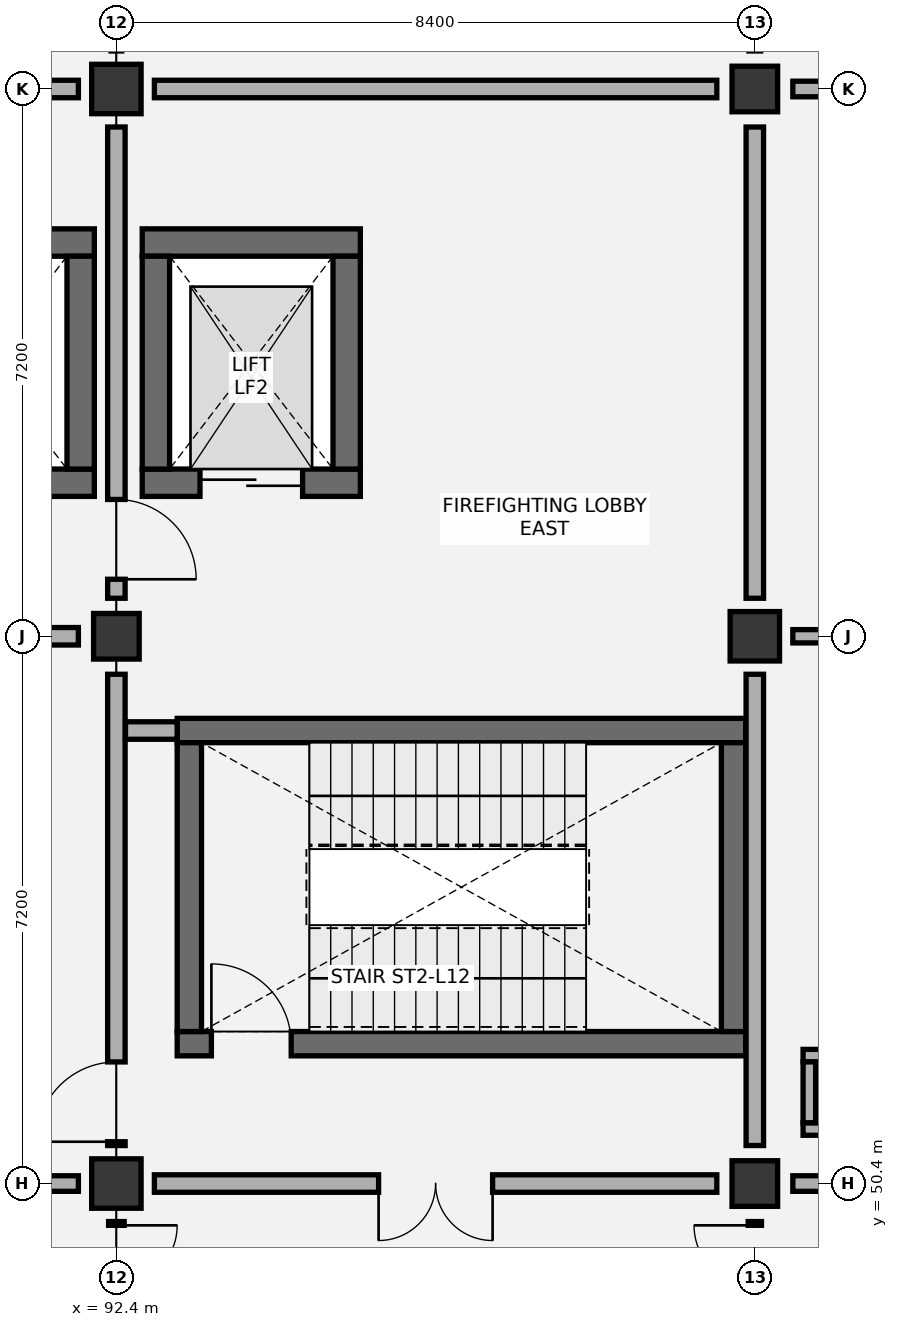
"""IFC4 building model, lengths in metres.
Left out: names, types, materials, properties, quantities, classifications, styles, units other than length and angle.
Written with IfcOpenShell. Run it as: python <this file> out.ifc"""

import sys

from ifc_helpers import new_model, si_unit, direction, frame, frame_2d, origin, origin_2d, place, context, subcontext, project, spatial, rectangle, extrude, element, fill, save


model = new_model("IFC4")
c1 = context("Model", 3, precision=1e-05, world=origin(), true_north=direction((0.0, 1.0)))
c2 = subcontext(c1, "Body", "Model", "MODEL_VIEW")
j1 = project(units=[si_unit("LENGTHUNIT", "METRE"), si_unit("PLANEANGLEUNIT", "RADIAN")], contexts=[c1])
p1 = place(None, origin())
s1 = spatial("IfcSite", under=j1, at=p1, CompositionType="ELEMENT")
p2 = place(p1, origin())
s2 = spatial("IfcBuilding", under=s1, at=p2, CompositionType="ELEMENT")
p3 = place(p2, frame((0.0, 0.0, 56.4)))
s3 = spatial("IfcBuildingStorey", under=s2, at=p3, CompositionType="ELEMENT", Elevation=56.4)
p4 = place(p3, frame((92.4, 50.4, 0.0), z_axis=(0.0, 0.0, 1.0), x_axis=(1.0, 0.0, 0.0)))
e1 = element("IfcColumn", 1, at=p4, inside=s3, PredefinedType="COLUMN", context=c2, shape_type="SweptSolid", body=[
    extrude(rectangle(XDim=0.65, YDim=0.65, at=origin_2d()), origin(), (0.0, 0.0, 1.0), 4.2),
])
p5 = place(p3, frame((92.4, 57.6, 0.0), z_axis=(0.0, 0.0, 1.0), x_axis=(1.0, 0.0, 0.0)))
e2 = element("IfcColumn", 2, at=p5, inside=s3, PredefinedType="COLUMN", context=c2, shape_type="SweptSolid", body=[
    extrude(rectangle(XDim=0.6, YDim=0.6, at=origin_2d()), origin(), (0.0, 0.0, 1.0), 4.2),
])
p6 = place(p3, frame((92.4, 64.8, 0.0), z_axis=(0.0, 0.0, 1.0), x_axis=(1.0, 0.0, 0.0)))
e3 = element("IfcColumn", 3, at=p6, inside=s3, PredefinedType="COLUMN", context=c2, shape_type="SweptSolid", body=[
    extrude(rectangle(XDim=0.65, YDim=0.65, at=origin_2d()), origin(), (0.0, 0.0, 1.0), 4.2),
])
p7 = place(p3, frame((100.8, 50.4, 0.0), z_axis=(0.0, 0.0, 1.0), x_axis=(1.0, 0.0, 0.0)))
e4 = element("IfcColumn", 4, at=p7, inside=s3, PredefinedType="COLUMN", context=c2, shape_type="SweptSolid", body=[
    extrude(rectangle(XDim=0.6, YDim=0.6, at=origin_2d()), origin(), (0.0, 0.0, 1.0), 4.2),
])
p8 = place(p3, frame((100.8, 57.6, 0.0), z_axis=(0.0, 0.0, 1.0), x_axis=(1.0, 0.0, 0.0)))
e5 = element("IfcColumn", 5, at=p8, inside=s3, PredefinedType="COLUMN", context=c2, shape_type="SweptSolid", body=[
    extrude(rectangle(XDim=0.65, YDim=0.65, at=origin_2d()), origin(), (0.0, 0.0, 1.0), 4.2),
])
p9 = place(p3, frame((100.8, 64.8, 0.0), z_axis=(0.0, 0.0, 1.0), x_axis=(1.0, 0.0, 0.0)))
e6 = element("IfcColumn", 6, at=p9, inside=s3, PredefinedType="COLUMN", context=c2, shape_type="SweptSolid", body=[
    extrude(rectangle(XDim=0.6, YDim=0.6, at=origin_2d()), origin(), (0.0, 0.0, 1.0), 4.2),
])
p10 = place(p3, frame((93.2, 52.24, 0.0), z_axis=(0.0, 0.0, 1.0), x_axis=(1.0, 0.0, 0.0)))
e7 = element("IfcWall", 7, at=p10, inside=s3, PredefinedType="SHEAR", context=c2, shape_type="SweptSolid", body=[
    extrude(rectangle(XDim=7.48, YDim=0.32, at=frame_2d((3.74, 0.0))), origin(), (0.0, 0.0, 1.0), 3.92),
])
p11 = place(p10, frame((0.45, 0.0, 0.0)))
e8 = element("IfcOpeningElement", 8, at=p11, cuts=e7, PredefinedType="OPENING", context=c2, shape_type="SweptSolid", body=[
    extrude(rectangle(XDim=1.05, YDim=2.15, at=frame_2d((0.525, 1.075))), frame((0.0, 0.17, 0.0), z_axis=(0.0, -1.0, 0.0), x_axis=(1.0, 0.0, 0.0)), (0.0, 0.0, 1.0), 0.34),
])
p12 = place(p3, frame((93.2, 56.36, 0.0), z_axis=(0.0, 0.0, 1.0), x_axis=(1.0, 0.0, 0.0)))
e9 = element("IfcWall", 9, at=p12, inside=s3, PredefinedType="SHEAR", context=c2, shape_type="SweptSolid", body=[
    extrude(rectangle(XDim=7.48, YDim=0.32, at=frame_2d((3.74, 0.0))), origin(), (0.0, 0.0, 1.0), 3.92),
])
for number, where, z_axis, x_axis in (
    (10, (93.36, 52.4, 0.0), (0.0, 0.0, 1.0), (0.0, 1.0, 0.0)),
    (11, (100.52, 52.4, 0.0), (0.0, 0.0, 1.0), (0.0, 1.0, 0.0)),
):
    element("IfcWall", number, at=place(p3, frame(where, z_axis=z_axis, x_axis=x_axis)), inside=s3, PredefinedType="SHEAR", context=c2, shape_type="SweptSolid", body=[
        extrude(rectangle(XDim=3.8, YDim=0.32, at=frame_2d((1.9, 0.0))), origin(), (0.0, 0.0, 1.0), 3.92),
    ])
p13 = place(p3, frame((84.34, 62.78, 0.0), z_axis=(0.0, 0.0, 1.0), x_axis=(1.0, 0.0, 0.0)))
e12 = element("IfcWall", 12, at=p13, inside=s3, PredefinedType="SHEAR", context=c2, shape_type="SweptSolid", body=[
    extrude(rectangle(XDim=7.77, YDim=0.36, at=frame_2d((3.885, 0.0))), origin(), (0.0, 0.0, 1.0), 3.92),
])
p14 = place(p3, frame((89.45, 59.62, 0.0), z_axis=(0.0, 0.0, 1.0), x_axis=(1.0, 0.0, 0.0)))
e13 = element("IfcWall", 13, at=p14, inside=s3, PredefinedType="SHEAR", context=c2, shape_type="SweptSolid", body=[
    extrude(rectangle(XDim=2.66, YDim=0.36, at=frame_2d((1.33, 0.0))), origin(), (0.0, 0.0, 1.0), 3.92),
])
p15 = place(p14, frame((0.78, 0.0, 0.0)))
e14 = element("IfcOpeningElement", 14, at=p15, cuts=e13, PredefinedType="OPENING", context=c2, shape_type="SweptSolid", body=[
    extrude(rectangle(XDim=1.1, YDim=2.15, at=frame_2d((0.55, 1.075))), frame((0.0, 0.19, 0.0), z_axis=(0.0, -1.0, 0.0), x_axis=(1.0, 0.0, 0.0)), (0.0, 0.0, 1.0), 0.38),
])
p16 = place(p3, frame((91.93, 59.8, 0.0), z_axis=(0.0, 0.0, 1.0), x_axis=(0.0, 1.0, 0.0)))
e15 = element("IfcWall", 15, at=p16, inside=s3, PredefinedType="SHEAR", context=c2, shape_type="SweptSolid", body=[
    extrude(rectangle(XDim=2.8, YDim=0.36, at=frame_2d((1.4, 0.0))), origin(), (0.0, 0.0, 1.0), 3.92),
])
p17 = place(p3, frame((92.74, 62.78, 0.0), z_axis=(0.0, 0.0, 1.0), x_axis=(1.0, 0.0, 0.0)))
e16 = element("IfcWall", 16, at=p17, inside=s3, PredefinedType="SHEAR", context=c2, shape_type="SweptSolid", body=[
    extrude(rectangle(XDim=2.87, YDim=0.36, at=frame_2d((1.435, 0.0))), origin(), (0.0, 0.0, 1.0), 3.92),
])
p18 = place(p3, frame((92.74, 59.62, 0.0), z_axis=(0.0, 0.0, 1.0), x_axis=(1.0, 0.0, 0.0)))
e17 = element("IfcWall", 17, at=p18, inside=s3, PredefinedType="SHEAR", context=c2, shape_type="SweptSolid", body=[
    extrude(rectangle(XDim=2.87, YDim=0.36, at=frame_2d((1.435, 0.0))), origin(), (0.0, 0.0, 1.0), 3.92),
])
p19 = place(p18, frame((0.76, 0.0, 0.0)))
e18 = element("IfcOpeningElement", 18, at=p19, cuts=e17, PredefinedType="OPENING", context=c2, shape_type="SweptSolid", body=[
    extrude(rectangle(XDim=1.35, YDim=2.2, at=frame_2d((0.675, 1.1))), frame((0.0, 0.19, 0.0), z_axis=(0.0, -1.0, 0.0), x_axis=(1.0, 0.0, 0.0)), (0.0, 0.0, 1.0), 0.38),
])
for number, where, z_axis, x_axis in (
    (19, (92.92, 59.8, 0.0), (0.0, 0.0, 1.0), (0.0, 1.0, 0.0)),
    (20, (95.43, 59.8, 0.0), (0.0, 0.0, 1.0), (0.0, 1.0, 0.0)),
):
    element("IfcWall", number, at=place(p3, frame(where, z_axis=z_axis, x_axis=x_axis)), inside=s3, PredefinedType="SHEAR", context=c2, shape_type="SweptSolid", body=[
        extrude(rectangle(XDim=2.8, YDim=0.36, at=frame_2d((1.4, 0.0))), origin(), (0.0, 0.0, 1.0), 3.92),
    ])
for number, where, z_axis, x_axis in (
    (21, (101.435, 51.117, 0.0), (0.0, 0.0, 1.0), (1.0, 0.0, 0.0)),
    (22, (101.435, 52.083, 0.0), (0.0, 0.0, 1.0), (1.0, 0.0, 0.0)),
):
    element("IfcWall", number, at=place(p3, frame(where, z_axis=z_axis, x_axis=x_axis)), inside=s3, PredefinedType="PARTITIONING", context=c2, shape_type="SweptSolid", body=[
        extrude(rectangle(XDim=1.43, YDim=0.165, at=frame_2d((0.715, 0.0))), origin(), (0.0, 0.0, 1.0), 3.85),
    ])
p20 = place(p3, frame((101.518, 51.2, 0.0), z_axis=(0.0, 0.0, 1.0), x_axis=(0.0, 1.0, 0.0)))
e23 = element("IfcWall", 23, at=p20, inside=s3, PredefinedType="PARTITIONING", context=c2, shape_type="SweptSolid", body=[
    extrude(rectangle(XDim=0.8, YDim=0.165, at=frame_2d((0.4, 0.0))), origin(), (0.0, 0.0, 1.0), 3.85),
])
p21 = place(p3, frame((92.4, 43.7, 0.0), z_axis=(0.0, 0.0, 1.0), x_axis=(0.0, 1.0, 0.0)))
e24 = element("IfcWall", 24, at=p21, inside=s3, PredefinedType="PARTITIONING", context=c2, shape_type="SweptSolid", body=[
    extrude(rectangle(XDim=6.2, YDim=0.205, at=frame_2d((3.1, 0.0))), origin(), (0.0, 0.0, 1.0), 3.415),
])
p22 = place(p21, frame((4.55, 0.0, 0.0)))
e25 = element("IfcOpeningElement", 25, at=p22, cuts=e24, PredefinedType="OPENING", context=c2, shape_type="SweptSolid", body=[
    extrude(rectangle(XDim=1.6, YDim=2.2, at=frame_2d((0.8, 1.1))), frame((0.0, 0.113, 0.0), z_axis=(0.0, -1.0, 0.0), x_axis=(1.0, 0.0, 0.0)), (0.0, 0.0, 1.0), 0.225),
])
p23 = place(p3, frame((84.5, 50.4, 0.0), z_axis=(0.0, 0.0, 1.0), x_axis=(1.0, 0.0, 0.0)))
e26 = element("IfcWall", 26, at=p23, inside=s3, PredefinedType="PARTITIONING", context=c2, shape_type="SweptSolid", body=[
    extrude(rectangle(XDim=7.4, YDim=0.205, at=frame_2d((3.7, 0.0))), origin(), (0.0, 0.0, 1.0), 3.415),
])
p24 = place(p23, frame((3.025, 0.0, 0.0)))
e27 = element("IfcOpeningElement", 27, at=p24, cuts=e26, PredefinedType="OPENING", context=c2, shape_type="SweptSolid", body=[
    extrude(rectangle(XDim=1.35, YDim=2.15, at=frame_2d((0.675, 1.075))), frame((0.0, 0.113, 0.0), z_axis=(0.0, -1.0, 0.0), x_axis=(1.0, 0.0, 0.0)), (0.0, 0.0, 1.0), 0.225),
])
p25 = place(p3, frame((92.4, 50.9, 0.0), z_axis=(0.0, 0.0, 1.0), x_axis=(0.0, 1.0, 0.0)))
e28 = element("IfcWall", 28, at=p25, inside=s3, PredefinedType="PARTITIONING", context=c2, shape_type="SweptSolid", body=[
    extrude(rectangle(XDim=6.2, YDim=0.23, at=frame_2d((3.1, 0.0))), origin(), (0.0, 0.0, 1.0), 3.515),
])
p26 = place(p25, frame((0.05, 0.0, 0.0)))
e29 = element("IfcOpeningElement", 29, at=p26, cuts=e28, PredefinedType="OPENING", context=c2, shape_type="SweptSolid", body=[
    extrude(rectangle(XDim=1.05, YDim=2.15, at=frame_2d((0.525, 1.075))), frame((0.0, 0.125, 0.0), z_axis=(0.0, -1.0, 0.0), x_axis=(1.0, 0.0, 0.0)), (0.0, 0.0, 1.0), 0.25),
])
p27 = place(p3, frame((84.5, 57.6, 0.0), z_axis=(0.0, 0.0, 1.0), x_axis=(1.0, 0.0, 0.0)))
e30 = element("IfcWall", 30, at=p27, inside=s3, PredefinedType="PARTITIONING", context=c2, shape_type="SweptSolid", body=[
    extrude(rectangle(XDim=7.4, YDim=0.23, at=frame_2d((3.7, 0.0))), origin(), (0.0, 0.0, 1.0), 3.415),
])
p28 = place(p27, frame((2.95, 0.0, 0.0)))
e31 = element("IfcOpeningElement", 31, at=p28, cuts=e30, PredefinedType="OPENING", context=c2, shape_type="SweptSolid", body=[
    extrude(rectangle(XDim=1.5, YDim=2.15, at=frame_2d((0.75, 1.075))), frame((0.0, 0.125, 0.0), z_axis=(0.0, -1.0, 0.0), x_axis=(1.0, 0.0, 0.0)), (0.0, 0.0, 1.0), 0.25),
])
p29 = place(p3, frame((92.4, 58.1, 0.0), z_axis=(0.0, 0.0, 1.0), x_axis=(0.0, 1.0, 0.0)))
e32 = element("IfcWall", 32, at=p29, inside=s3, PredefinedType="PARTITIONING", context=c2, shape_type="SweptSolid", body=[
    extrude(rectangle(XDim=6.2, YDim=0.23, at=frame_2d((3.1, 0.0))), origin(), (0.0, 0.0, 1.0), 3.415),
])
p30 = place(p29, frame((0.25, 0.0, 0.0)))
e33 = element("IfcOpeningElement", 33, at=p30, cuts=e32, PredefinedType="OPENING", context=c2, shape_type="SweptSolid", body=[
    extrude(rectangle(XDim=1.05, YDim=2.15, at=frame_2d((0.525, 1.075))), frame((0.0, 0.125, 0.0), z_axis=(0.0, -1.0, 0.0), x_axis=(1.0, 0.0, 0.0)), (0.0, 0.0, 1.0), 0.25),
])
p31 = place(p3, frame((84.5, 64.8, 0.0), z_axis=(0.0, 0.0, 1.0), x_axis=(1.0, 0.0, 0.0)))
e34 = element("IfcWall", 34, at=p31, inside=s3, PredefinedType="PARTITIONING", context=c2, shape_type="SweptSolid", body=[
    extrude(rectangle(XDim=7.4, YDim=0.23, at=frame_2d((3.7, 0.0))), origin(), (0.0, 0.0, 1.0), 3.415),
])
p32 = place(p3, frame((100.8, 43.7, 0.0), z_axis=(0.0, 0.0, 1.0), x_axis=(0.0, 1.0, 0.0)))
e35 = element("IfcWall", 35, at=p32, inside=s3, PredefinedType="PARTITIONING", context=c2, shape_type="SweptSolid", body=[
    extrude(rectangle(XDim=6.2, YDim=0.175, at=frame_2d((3.1, 0.0))), origin(), (0.0, 0.0, 1.0), 3.515),
])
p33 = place(p32, frame((4.55, 0.0, 0.0)))
e36 = element("IfcOpeningElement", 36, at=p33, cuts=e35, PredefinedType="OPENING", context=c2, shape_type="SweptSolid", body=[
    extrude(rectangle(XDim=1.6, YDim=2.2, at=frame_2d((0.8, 1.1))), frame((0.0, 0.097, 0.0), z_axis=(0.0, -1.0, 0.0), x_axis=(1.0, 0.0, 0.0)), (0.0, 0.0, 1.0), 0.195),
])
p34 = place(p3, frame((92.9, 50.4, 0.0), z_axis=(0.0, 0.0, 1.0), x_axis=(1.0, 0.0, 0.0)))
e37 = element("IfcWall", 37, at=p34, inside=s3, PredefinedType="PARTITIONING", context=c2, shape_type="SweptSolid", body=[
    extrude(rectangle(XDim=7.4, YDim=0.23, at=frame_2d((3.7, 0.0))), origin(), (0.0, 0.0, 1.0), 3.415),
])
p35 = place(p34, frame((2.95, 0.0, 0.0)))
e38 = element("IfcOpeningElement", 38, at=p35, cuts=e37, PredefinedType="OPENING", context=c2, shape_type="SweptSolid", body=[
    extrude(rectangle(XDim=1.5, YDim=2.15, at=frame_2d((0.75, 1.075))), frame((0.0, 0.125, 0.0), z_axis=(0.0, -1.0, 0.0), x_axis=(1.0, 0.0, 0.0)), (0.0, 0.0, 1.0), 0.25),
])
p36 = place(p3, frame((100.8, 50.9, 0.0), z_axis=(0.0, 0.0, 1.0), x_axis=(0.0, 1.0, 0.0)))
e39 = element("IfcWall", 39, at=p36, inside=s3, PredefinedType="PARTITIONING", context=c2, shape_type="SweptSolid", body=[
    extrude(rectangle(XDim=6.2, YDim=0.23, at=frame_2d((3.1, 0.0))), origin(), (0.0, 0.0, 1.0), 3.415),
])
p37 = place(p3, frame((92.52, 56.36, 0.0), z_axis=(0.0, 0.0, 1.0), x_axis=(1.0, 0.0, 0.0)))
e40 = element("IfcWall", 40, at=p37, inside=s3, PredefinedType="PARTITIONING", context=c2, shape_type="SweptSolid", body=[
    extrude(rectangle(XDim=0.68, YDim=0.23, at=frame_2d((0.34, 0.0))), origin(), (0.0, 0.0, 1.0), 3.92),
])
p38 = place(p3, frame((100.8, 58.1, 0.0), z_axis=(0.0, 0.0, 1.0), x_axis=(0.0, 1.0, 0.0)))
e41 = element("IfcWall", 41, at=p38, inside=s3, PredefinedType="PARTITIONING", context=c2, shape_type="SweptSolid", body=[
    extrude(rectangle(XDim=6.2, YDim=0.23, at=frame_2d((3.1, 0.0))), origin(), (0.0, 0.0, 1.0), 3.625),
])
p39 = place(p3, frame((92.9, 64.8, 0.0), z_axis=(0.0, 0.0, 1.0), x_axis=(1.0, 0.0, 0.0)))
e42 = element("IfcWall", 42, at=p39, inside=s3, PredefinedType="PARTITIONING", context=c2, shape_type="SweptSolid", body=[
    extrude(rectangle(XDim=7.4, YDim=0.23, at=frame_2d((3.7, 0.0))), origin(), (0.0, 0.0, 1.0), 3.415),
])
p40 = place(p3, frame((101.3, 50.4, 0.0), z_axis=(0.0, 0.0, 1.0), x_axis=(1.0, 0.0, 0.0)))
e43 = element("IfcWall", 43, at=p40, inside=s3, PredefinedType="PARTITIONING", context=c2, shape_type="SweptSolid", body=[
    extrude(rectangle(XDim=7.4, YDim=0.205, at=frame_2d((3.7, 0.0))), origin(), (0.0, 0.0, 1.0), 3.415),
])
p41 = place(p40, frame((2.975, 0.0, 0.0)))
e44 = element("IfcOpeningElement", 44, at=p41, cuts=e43, PredefinedType="OPENING", context=c2, shape_type="SweptSolid", body=[
    extrude(rectangle(XDim=1.45, YDim=2.2, at=frame_2d((0.725, 1.1))), frame((0.0, 0.113, 0.0), z_axis=(0.0, -1.0, 0.0), x_axis=(1.0, 0.0, 0.0)), (0.0, 0.0, 1.0), 0.225),
])
p42 = place(p3, frame((101.3, 57.6, 0.0), z_axis=(0.0, 0.0, 1.0), x_axis=(1.0, 0.0, 0.0)))
e45 = element("IfcWall", 45, at=p42, inside=s3, PredefinedType="PARTITIONING", context=c2, shape_type="SweptSolid", body=[
    extrude(rectangle(XDim=7.4, YDim=0.175, at=frame_2d((3.7, 0.0))), origin(), (0.0, 0.0, 1.0), 3.415),
])
p43 = place(p42, frame((3.025, 0.0, 0.0)))
e46 = element("IfcOpeningElement", 46, at=p43, cuts=e45, PredefinedType="OPENING", context=c2, shape_type="SweptSolid", body=[
    extrude(rectangle(XDim=1.35, YDim=2.15, at=frame_2d((0.675, 1.075))), frame((0.0, 0.097, 0.0), z_axis=(0.0, -1.0, 0.0), x_axis=(1.0, 0.0, 0.0)), (0.0, 0.0, 1.0), 0.195),
])
p44 = place(p3, frame((101.3, 64.8, 0.0), z_axis=(0.0, 0.0, 1.0), x_axis=(1.0, 0.0, 0.0)))
e47 = element("IfcWall", 47, at=p44, inside=s3, PredefinedType="PARTITIONING", context=c2, shape_type="SweptSolid", body=[
    extrude(rectangle(XDim=7.4, YDim=0.205, at=frame_2d((3.7, 0.0))), origin(), (0.0, 0.0, 1.0), 3.415),
])
p45 = place(p44, frame((2.95, 0.0, 0.0)))
e48 = element("IfcOpeningElement", 48, at=p45, cuts=e47, PredefinedType="OPENING", context=c2, shape_type="SweptSolid", body=[
    extrude(rectangle(XDim=1.5, YDim=2.2, at=frame_2d((0.75, 1.1))), frame((0.0, 0.113, 0.0), z_axis=(0.0, -1.0, 0.0), x_axis=(1.0, 0.0, 0.0)), (0.0, 0.0, 1.0), 0.225),
])
p46 = place(p11, origin())
e49 = element("IfcDoor", 49, at=p46, inside=s3, OperationType="SINGLE_SWING_LEFT", PredefinedType="DOOR", context=c2, shape_type="SweptSolid", body=[
    extrude(rectangle(XDim=1.05, YDim=2.15, at=frame_2d((0.525, 1.075))), frame((0.0, 0.025, 0.0), z_axis=(0.0, -1.0, 0.0), x_axis=(1.0, 0.0, 0.0)), (0.0, 0.0, 1.0), 0.05),
])
fill(e8, e49)
p47 = place(p19, origin())
e50 = element("IfcDoor", 50, at=p47, inside=s3, OperationType="DOUBLE_DOOR_SLIDING", PredefinedType="DOOR", context=c2, shape_type="SweptSolid", body=[
    extrude(rectangle(XDim=1.35, YDim=2.2, at=frame_2d((0.675, 1.1))), frame((0.0, 0.025, 0.0), z_axis=(0.0, -1.0, 0.0), x_axis=(1.0, 0.0, 0.0)), (0.0, 0.0, 1.0), 0.05),
])
fill(e18, e50)
p48 = place(p22, frame((1.6, 0.0, 0.0), z_axis=(0.0, 0.0, 1.0), x_axis=(-1.0, 0.0, 0.0)))
e51 = element("IfcDoor", 51, at=p48, inside=s3, OperationType="DOUBLE_DOOR_SINGLE_SWING", PredefinedType="DOOR", context=c2, shape_type="SweptSolid", body=[
    extrude(rectangle(XDim=1.6, YDim=2.2, at=frame_2d((0.8, 1.1))), frame((0.0, 0.025, 0.0), z_axis=(0.0, -1.0, 0.0), x_axis=(1.0, 0.0, 0.0)), (0.0, 0.0, 1.0), 0.05),
])
fill(e25, e51)
p49 = place(p26, origin())
e52 = element("IfcDoor", 52, at=p49, inside=s3, OperationType="SINGLE_SWING_LEFT", PredefinedType="DOOR", context=c2, shape_type="SweptSolid", body=[
    extrude(rectangle(XDim=1.05, YDim=2.15, at=frame_2d((0.525, 1.075))), frame((0.0, 0.025, 0.0), z_axis=(0.0, -1.0, 0.0), x_axis=(1.0, 0.0, 0.0)), (0.0, 0.0, 1.0), 0.05),
])
fill(e29, e52)
p50 = place(p30, frame((1.05, 0.0, 0.0), z_axis=(0.0, 0.0, 1.0), x_axis=(-1.0, 0.0, 0.0)))
e53 = element("IfcDoor", 53, at=p50, inside=s3, OperationType="SINGLE_SWING_RIGHT", PredefinedType="DOOR", context=c2, shape_type="SweptSolid", body=[
    extrude(rectangle(XDim=1.05, YDim=2.15, at=frame_2d((0.525, 1.075))), frame((0.0, 0.025, 0.0), z_axis=(0.0, -1.0, 0.0), x_axis=(1.0, 0.0, 0.0)), (0.0, 0.0, 1.0), 0.05),
])
fill(e33, e53)
p51 = place(p33, origin())
e54 = element("IfcDoor", 54, at=p51, inside=s3, OperationType="DOUBLE_DOOR_SINGLE_SWING", PredefinedType="DOOR", context=c2, shape_type="SweptSolid", body=[
    extrude(rectangle(XDim=1.6, YDim=2.2, at=frame_2d((0.8, 1.1))), frame((0.0, 0.025, 0.0), z_axis=(0.0, -1.0, 0.0), x_axis=(1.0, 0.0, 0.0)), (0.0, 0.0, 1.0), 0.05),
])
fill(e36, e54)
p52 = place(p35, frame((1.5, 0.0, 0.0), z_axis=(0.0, 0.0, 1.0), x_axis=(-1.0, 0.0, 0.0)))
e55 = element("IfcDoor", 55, at=p52, inside=s3, OperationType="DOUBLE_DOOR_SINGLE_SWING", PredefinedType="DOOR", context=c2, shape_type="SweptSolid", body=[
    extrude(rectangle(XDim=1.5, YDim=2.15, at=frame_2d((0.75, 1.075))), frame((0.0, 0.025, 0.0), z_axis=(0.0, -1.0, 0.0), x_axis=(1.0, 0.0, 0.0)), (0.0, 0.0, 1.0), 0.05),
])
fill(e38, e55)
save(model, sys.argv[1])
